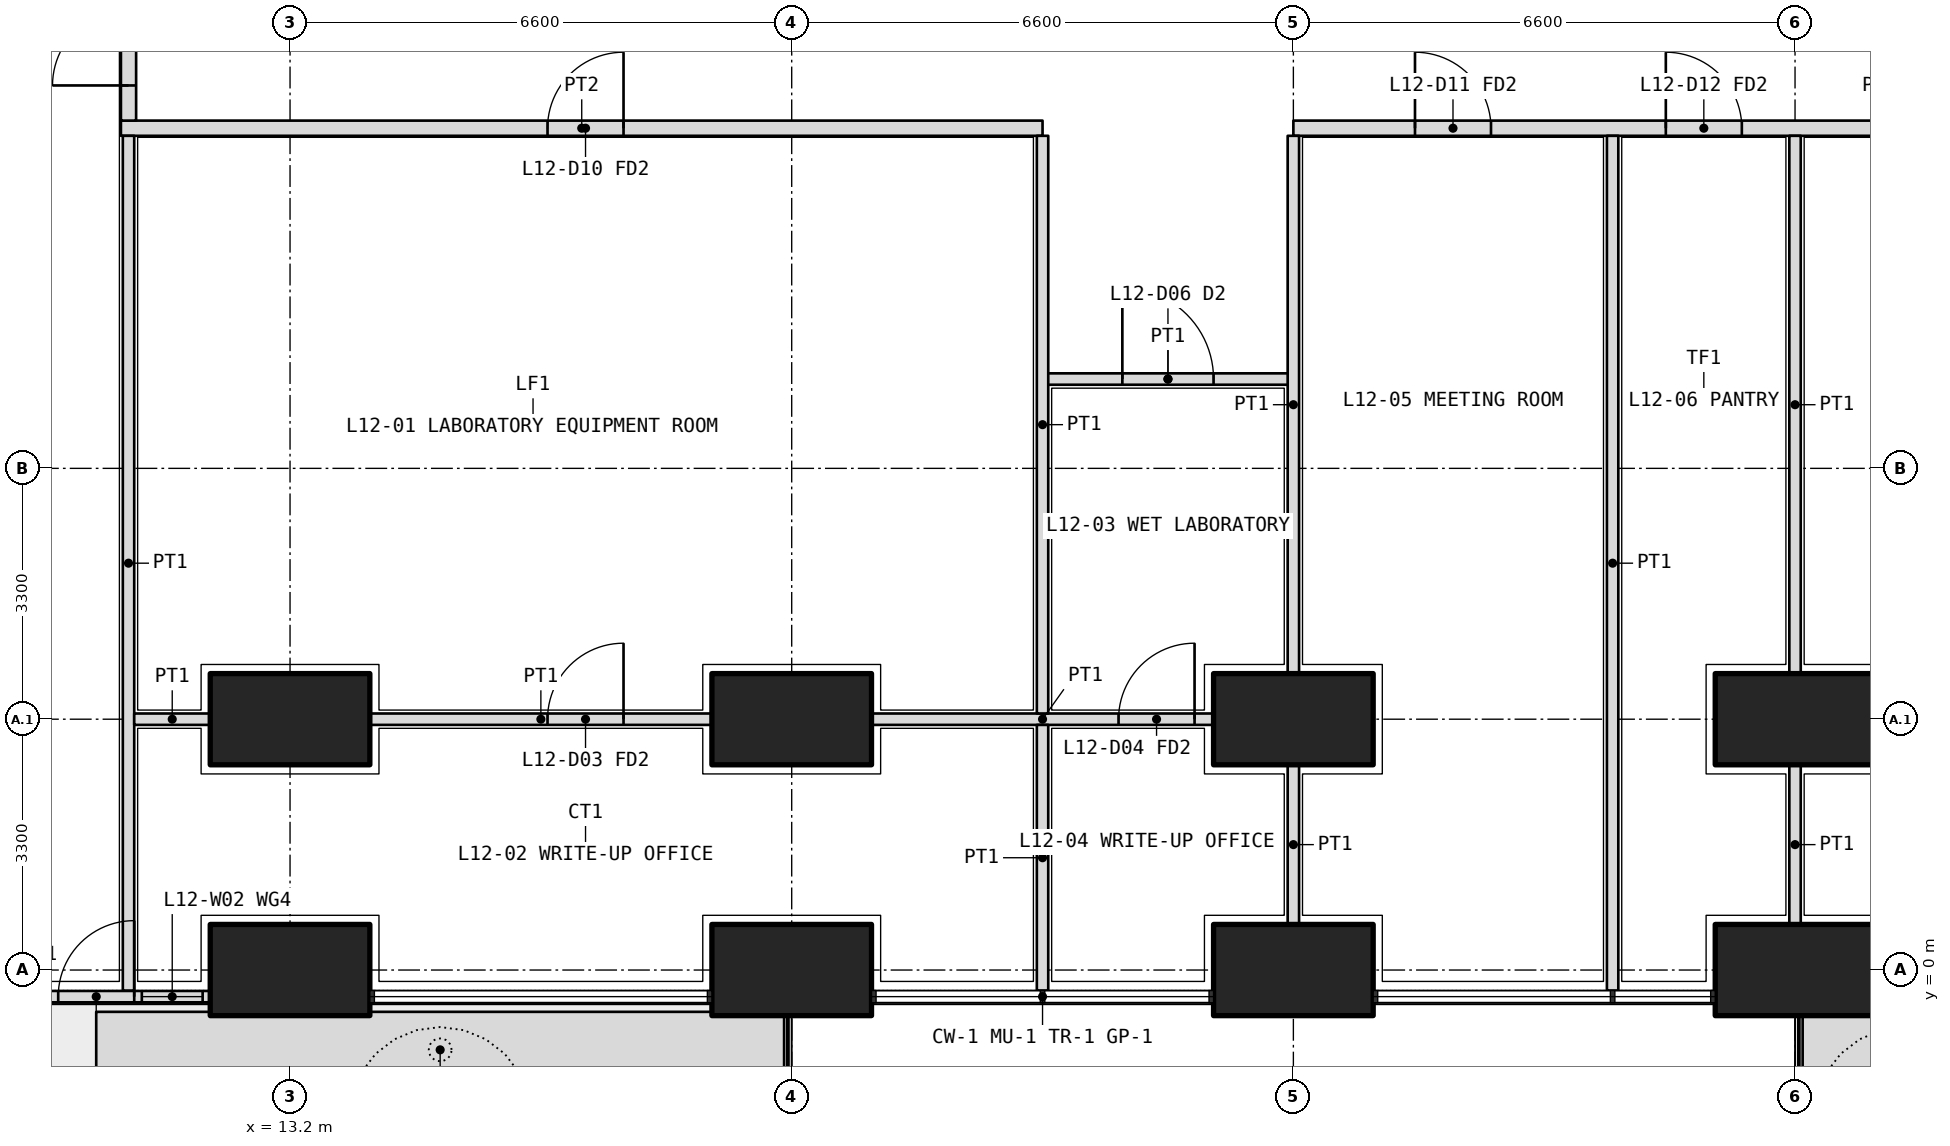
"""IFC4 building model, lengths in metres.
Left out: names, types, materials, properties, quantities, classifications, styles, units other than length and angle.
Written with IfcOpenShell. Run it as: python <this file> out.ifc"""

import sys

from ifc_helpers import new_model, si_unit, direction, frame, frame_2d, origin, origin_2d, place, context, subcontext, project, spatial, polyline, rectangle, outline, extrude, element, fill, save


model = new_model("IFC4")
c1 = context("Model", 3, precision=1e-05, world=origin(), true_north=direction((0.0, 1.0)))
c2 = subcontext(c1, "Body", "Model", "MODEL_VIEW")
j1 = project(units=[si_unit("LENGTHUNIT", "METRE"), si_unit("PLANEANGLEUNIT", "RADIAN")], contexts=[c1])
p1 = place(None, origin())
s1 = spatial("IfcSite", under=j1, at=p1, CompositionType="ELEMENT")
p2 = place(p1, origin())
s2 = spatial("IfcBuilding", under=s1, at=p2, CompositionType="ELEMENT")
p3 = place(p2, frame((0.0, 0.0, 54.9)))
s3 = spatial("IfcBuildingStorey", under=s2, at=p3, CompositionType="ELEMENT", Elevation=54.9)
for number, where, z_axis, x_axis in (
    (1, (13.2, 0.0, 0.0), (0.0, 0.0, 1.0), (1.0, 0.0, 0.0)),
    (2, (19.8, 0.0, 0.0), (0.0, 0.0, 1.0), (1.0, 0.0, 0.0)),
    (3, (26.4, 0.0, 0.0), (0.0, 0.0, 1.0), (1.0, 0.0, 0.0)),
    (4, (33.0, 0.0, 0.0), (0.0, 0.0, 1.0), (1.0, 0.0, 0.0)),
    (5, (13.2, 3.3, 0.0), (0.0, 0.0, 1.0), (1.0, 0.0, 0.0)),
    (6, (19.8, 3.3, 0.0), (0.0, 0.0, 1.0), (1.0, 0.0, 0.0)),
    (7, (26.4, 3.3, 0.0), (0.0, 0.0, 1.0), (1.0, 0.0, 0.0)),
    (8, (33.0, 3.3, 0.0), (0.0, 0.0, 1.0), (1.0, 0.0, 0.0)),
):
    element("IfcColumn", number, at=place(p3, frame(where, z_axis=z_axis, x_axis=x_axis)), inside=s3, PredefinedType="COLUMN", context=c2, shape_type="SweptSolid", body=[
        extrude(rectangle(XDim=2.1, YDim=1.2, at=origin_2d()), origin(), (0.0, 0.0, 1.0), 4.2),
    ])
p4 = place(p3, origin())
e9 = element("IfcWall", 9, at=p4, inside=s3, PredefinedType="USERDEFINED", context=c2, shape_type="SweptSolid", body=[
    extrude(outline(polyline([(10.65, -1.55), (19.7, -1.55), (19.7, -0.55), (10.65, -0.55), (10.65, -1.55)]), holes=[polyline([(10.8, -1.4), (19.55, -1.4), (19.55, -0.7), (10.8, -0.7), (10.8, -1.4)])]), origin(), (0.0, 0.0, 1.0), 1.05),
])
p5 = place(p3, origin())
e10 = element("IfcWall", 10, at=p5, inside=s3, PredefinedType="USERDEFINED", context=c2, shape_type="SweptSolid", body=[
    extrude(outline(polyline([(33.1, -1.55), (35.55, -1.55), (35.55, -0.55), (33.1, -0.55), (33.1, -1.55)]), holes=[polyline([(33.25, -1.4), (35.4, -1.4), (35.4, -0.7), (33.25, -0.7), (33.25, -1.4)])]), origin(), (0.0, 0.0, 1.0), 1.05),
])
p6 = place(p3, frame((7.65, -0.35, 0.0), z_axis=(0.0, 0.0, 1.0), x_axis=(1.0, 0.0, 0.0)))
e11 = element("IfcWall", 11, at=p6, inside=s3, PredefinedType="SOLIDWALL", context=c2, shape_type="SweptSolid", body=[
    extrude(rectangle(XDim=4.5, YDim=0.15, at=frame_2d((2.25, 0.0))), origin(), (0.0, 0.0, 1.0), 2.7),
])
p7 = place(p6, frame((2.5, 0.0, 0.0)))
e12 = element("IfcOpeningElement", 12, at=p7, cuts=e11, PredefinedType="OPENING", context=c2, shape_type="SweptSolid", body=[
    extrude(rectangle(XDim=1.0, YDim=2.4, at=frame_2d((0.5, 1.2))), frame((0.0, 0.085, 0.0), z_axis=(0.0, -1.0, 0.0), x_axis=(1.0, 0.0, 0.0)), (0.0, 0.0, 1.0), 0.17),
])
p8 = place(p6, frame((0.1, 0.0, 0.1)))
e13 = element("IfcOpeningElement", 13, at=p8, cuts=e11, PredefinedType="OPENING", context=c2, shape_type="SweptSolid", body=[
    extrude(rectangle(XDim=1.9, YDim=2.3, at=frame_2d((0.95, 1.15))), frame((0.0, 0.085, 0.0), z_axis=(0.0, -1.0, 0.0), x_axis=(1.0, 0.0, 0.0)), (0.0, 0.0, 1.0), 0.17),
])
p9 = place(p6, frame((3.6, 0.0, 0.1)))
e14 = element("IfcOpeningElement", 14, at=p9, cuts=e11, PredefinedType="OPENING", context=c2, shape_type="SweptSolid", body=[
    extrude(rectangle(XDim=0.8, YDim=2.3, at=frame_2d((0.4, 1.15))), frame((0.0, 0.085, 0.0), z_axis=(0.0, -1.0, 0.0), x_axis=(1.0, 0.0, 0.0)), (0.0, 0.0, 1.0), 0.17),
])
p10 = place(p3, frame((10.975, 11.075, 0.0), z_axis=(0.0, 0.0, 1.0), x_axis=(1.0, 0.0, 0.0)))
e15 = element("IfcWall", 15, at=p10, inside=s3, PredefinedType="PARTITIONING", context=c2, shape_type="SweptSolid", body=[
    extrude(rectangle(XDim=12.125, YDim=0.2, at=frame_2d((6.062, 0.0))), origin(), (0.0, 0.0, 1.0), 2.85),
])
p11 = place(p10, frame((5.613, 0.0, 0.0)))
e16 = element("IfcOpeningElement", 16, at=p11, cuts=e15, PredefinedType="OPENING", context=c2, shape_type="SweptSolid", body=[
    extrude(rectangle(XDim=1.0, YDim=2.1, at=frame_2d((0.5, 1.05))), frame((0.0, 0.11, 0.0), z_axis=(0.0, -1.0, 0.0), x_axis=(1.0, 0.0, 0.0)), (0.0, 0.0, 1.0), 0.22),
])
p12 = place(p3, frame((26.4, 11.075, 0.0), z_axis=(0.0, 0.0, 1.0), x_axis=(1.0, 0.0, 0.0)))
e17 = element("IfcWall", 17, at=p12, inside=s3, PredefinedType="PARTITIONING", context=c2, shape_type="SweptSolid", body=[
    extrude(rectangle(XDim=15.425, YDim=0.2, at=frame_2d((7.712, 0.0))), origin(), (0.0, 0.0, 1.0), 2.85),
])
p13 = place(p12, frame((1.6, 0.0, 0.0)))
e18 = element("IfcOpeningElement", 18, at=p13, cuts=e17, PredefinedType="OPENING", context=c2, shape_type="SweptSolid", body=[
    extrude(rectangle(XDim=1.0, YDim=2.1, at=frame_2d((0.5, 1.05))), frame((0.0, 0.11, 0.0), z_axis=(0.0, -1.0, 0.0), x_axis=(1.0, 0.0, 0.0)), (0.0, 0.0, 1.0), 0.22),
])
p14 = place(p12, frame((4.9, 0.0, 0.0)))
e19 = element("IfcOpeningElement", 19, at=p14, cuts=e17, PredefinedType="OPENING", context=c2, shape_type="SweptSolid", body=[
    extrude(rectangle(XDim=1.0, YDim=2.1, at=frame_2d((0.5, 1.05))), frame((0.0, 0.11, 0.0), z_axis=(0.0, -1.0, 0.0), x_axis=(1.0, 0.0, 0.0)), (0.0, 0.0, 1.0), 0.22),
])
p15 = place(p12, frame((10.363, 0.0, 0.0)))
e20 = element("IfcOpeningElement", 20, at=p15, cuts=e17, PredefinedType="OPENING", context=c2, shape_type="SweptSolid", body=[
    extrude(rectangle(XDim=1.2, YDim=2.1, at=frame_2d((0.6, 1.05))), frame((0.0, 0.11, 0.0), z_axis=(0.0, -1.0, 0.0), x_axis=(1.0, 0.0, 0.0)), (0.0, 0.0, 1.0), 0.22),
])
p16 = place(p3, frame((11.075, 11.175, 0.0), z_axis=(0.0, 0.0, 1.0), x_axis=(0.0, 1.0, 0.0)))
e21 = element("IfcWall", 21, at=p16, inside=s3, PredefinedType="PARTITIONING", context=c2, shape_type="SweptSolid", body=[
    extrude(rectangle(XDim=23.85, YDim=0.2, at=frame_2d((11.925, 0.0))), origin(), (0.0, 0.0, 1.0), 2.85),
])
p17 = place(p16, frame((0.462, 0.0, 0.0)))
e22 = element("IfcOpeningElement", 22, at=p17, cuts=e21, PredefinedType="OPENING", context=c2, shape_type="SweptSolid", body=[
    extrude(rectangle(XDim=1.0, YDim=2.1, at=frame_2d((0.5, 1.05))), frame((0.0, 0.11, 0.0), z_axis=(0.0, -1.0, 0.0), x_axis=(1.0, 0.0, 0.0)), (0.0, 0.0, 1.0), 0.22),
])
p18 = place(p16, frame((2.575, 0.0, 0.0)))
e23 = element("IfcOpeningElement", 23, at=p18, cuts=e21, PredefinedType="OPENING", context=c2, shape_type="SweptSolid", body=[
    extrude(rectangle(XDim=1.0, YDim=2.1, at=frame_2d((0.5, 1.05))), frame((0.0, 0.11, 0.0), z_axis=(0.0, -1.0, 0.0), x_axis=(1.0, 0.0, 0.0)), (0.0, 0.0, 1.0), 0.22),
])
p19 = place(p16, frame((5.625, 0.0, 0.0)))
e24 = element("IfcOpeningElement", 24, at=p19, cuts=e21, PredefinedType="OPENING", context=c2, shape_type="SweptSolid", body=[
    extrude(rectangle(XDim=0.9, YDim=2.1, at=frame_2d((0.45, 1.05))), frame((0.0, 0.11, 0.0), z_axis=(0.0, -1.0, 0.0), x_axis=(1.0, 0.0, 0.0)), (0.0, 0.0, 1.0), 0.22),
])
p20 = place(p16, frame((9.425, 0.0, 0.0)))
e25 = element("IfcOpeningElement", 25, at=p20, cuts=e21, PredefinedType="OPENING", context=c2, shape_type="SweptSolid", body=[
    extrude(rectangle(XDim=0.9, YDim=2.1, at=frame_2d((0.45, 1.05))), frame((0.0, 0.11, 0.0), z_axis=(0.0, -1.0, 0.0), x_axis=(1.0, 0.0, 0.0)), (0.0, 0.0, 1.0), 0.22),
])
p21 = place(p16, frame((12.975, 0.0, 0.0)))
e26 = element("IfcOpeningElement", 26, at=p21, cuts=e21, PredefinedType="OPENING", context=c2, shape_type="SweptSolid", body=[
    extrude(rectangle(XDim=1.0, YDim=2.1, at=frame_2d((0.5, 1.05))), frame((0.0, 0.11, 0.0), z_axis=(0.0, -1.0, 0.0), x_axis=(1.0, 0.0, 0.0)), (0.0, 0.0, 1.0), 0.22),
])
p22 = place(p16, frame((18.025, 0.0, 0.0)))
e27 = element("IfcOpeningElement", 27, at=p22, cuts=e21, PredefinedType="OPENING", context=c2, shape_type="SweptSolid", body=[
    extrude(rectangle(XDim=1.0, YDim=2.1, at=frame_2d((0.5, 1.05))), frame((0.0, 0.11, 0.0), z_axis=(0.0, -1.0, 0.0), x_axis=(1.0, 0.0, 0.0)), (0.0, 0.0, 1.0), 0.22),
])
p23 = place(p16, frame((22.387, 0.0, 0.0)))
e28 = element("IfcOpeningElement", 28, at=p23, cuts=e21, PredefinedType="OPENING", context=c2, shape_type="SweptSolid", body=[
    extrude(rectangle(XDim=1.0, YDim=2.1, at=frame_2d((0.5, 1.05))), frame((0.0, 0.11, 0.0), z_axis=(0.0, -1.0, 0.0), x_axis=(1.0, 0.0, 0.0)), (0.0, 0.0, 1.0), 0.22),
])
p24 = place(p3, frame((11.075, -0.27, 0.0), z_axis=(0.0, 0.0, 1.0), x_axis=(0.0, 1.0, 0.0)))
e29 = element("IfcWall", 29, at=p24, inside=s3, PredefinedType="PARTITIONING", context=c2, shape_type="SweptSolid", body=[
    extrude(rectangle(XDim=11.245, YDim=0.15, at=frame_2d((5.623, 0.0))), origin(), (0.0, 0.0, 1.0), 2.7),
])
p25 = place(p3, frame((11.15, 3.3, 0.0), z_axis=(0.0, 0.0, 1.0), x_axis=(1.0, 0.0, 0.0)))
e30 = element("IfcWall", 30, at=p25, inside=s3, PredefinedType="PARTITIONING", context=c2, shape_type="SweptSolid", body=[
    extrude(rectangle(XDim=1.0, YDim=0.15, at=frame_2d((0.5, 0.0))), origin(), (0.0, 0.0, 1.0), 3.9),
])
p26 = place(p3, frame((14.25, 3.3, 0.0), z_axis=(0.0, 0.0, 1.0), x_axis=(1.0, 0.0, 0.0)))
e31 = element("IfcWall", 31, at=p26, inside=s3, PredefinedType="PARTITIONING", context=c2, shape_type="SweptSolid", body=[
    extrude(rectangle(XDim=4.5, YDim=0.15, at=frame_2d((2.25, 0.0))), origin(), (0.0, 0.0, 1.0), 3.9),
])
p27 = place(p26, frame((2.337, 0.0, 0.0)))
e32 = element("IfcOpeningElement", 32, at=p27, cuts=e31, PredefinedType="OPENING", context=c2, shape_type="SweptSolid", body=[
    extrude(rectangle(XDim=1.0, YDim=2.1, at=frame_2d((0.5, 1.05))), frame((0.0, 0.085, 0.0), z_axis=(0.0, -1.0, 0.0), x_axis=(1.0, 0.0, 0.0)), (0.0, 0.0, 1.0), 0.17),
])
p28 = place(p3, frame((20.85, 3.3, 0.0), z_axis=(0.0, 0.0, 1.0), x_axis=(1.0, 0.0, 0.0)))
e33 = element("IfcWall", 33, at=p28, inside=s3, PredefinedType="PARTITIONING", context=c2, shape_type="SweptSolid", body=[
    extrude(rectangle(XDim=4.5, YDim=0.15, at=frame_2d((2.25, 0.0))), origin(), (0.0, 0.0, 1.0), 3.9),
])
p29 = place(p28, frame((3.25, 0.0, 0.0)))
e34 = element("IfcOpeningElement", 34, at=p29, cuts=e33, PredefinedType="OPENING", context=c2, shape_type="SweptSolid", body=[
    extrude(rectangle(XDim=1.0, YDim=2.1, at=frame_2d((0.5, 1.05))), frame((0.0, 0.085, 0.0), z_axis=(0.0, -1.0, 0.0), x_axis=(1.0, 0.0, 0.0)), (0.0, 0.0, 1.0), 0.17),
])
p30 = place(p3, frame((23.1, 7.775, 0.0), z_axis=(0.0, 0.0, 1.0), x_axis=(1.0, 0.0, 0.0)))
e35 = element("IfcWall", 35, at=p30, inside=s3, PredefinedType="PARTITIONING", context=c2, shape_type="SweptSolid", body=[
    extrude(rectangle(XDim=3.3, YDim=0.15, at=frame_2d((1.65, 0.0))), origin(), (0.0, 0.0, 1.0), 2.85),
])
p31 = place(p30, frame((1.05, 0.0, 0.0)))
e36 = element("IfcOpeningElement", 36, at=p31, cuts=e35, PredefinedType="OPENING", context=c2, shape_type="SweptSolid", body=[
    extrude(rectangle(XDim=1.2, YDim=2.1, at=frame_2d((0.6, 1.05))), frame((0.0, 0.085, 0.0), z_axis=(0.0, -1.0, 0.0), x_axis=(1.0, 0.0, 0.0)), (0.0, 0.0, 1.0), 0.17),
])
p32 = place(p3, frame((30.6, -0.27, 0.0), z_axis=(0.0, 0.0, 1.0), x_axis=(0.0, 1.0, 0.0)))
e37 = element("IfcWall", 37, at=p32, inside=s3, PredefinedType="PARTITIONING", context=c2, shape_type="SweptSolid", body=[
    extrude(rectangle(XDim=11.245, YDim=0.15, at=frame_2d((5.623, 0.0))), origin(), (0.0, 0.0, 1.0), 2.7),
])
p33 = place(p3, frame((33.0, 0.6, 0.0), z_axis=(0.0, 0.0, 1.0), x_axis=(0.0, 1.0, 0.0)))
e38 = element("IfcWall", 38, at=p33, inside=s3, PredefinedType="PARTITIONING", context=c2, shape_type="SweptSolid", body=[
    extrude(rectangle(XDim=2.1, YDim=0.15, at=frame_2d((1.05, 0.0))), origin(), (0.0, 0.0, 1.0), 2.85),
])
p34 = place(p3, frame((33.0, 3.9, 0.0), z_axis=(0.0, 0.0, 1.0), x_axis=(0.0, 1.0, 0.0)))
e39 = element("IfcWall", 39, at=p34, inside=s3, PredefinedType="PARTITIONING", context=c2, shape_type="SweptSolid", body=[
    extrude(rectangle(XDim=7.075, YDim=0.15, at=frame_2d((3.538, 0.0))), origin(), (0.0, 0.0, 1.0), 2.85),
])
p35 = place(p3, frame((23.1, -0.27, 0.0), z_axis=(0.0, 0.0, 1.0), x_axis=(0.0, 1.0, 0.0)))
e40 = element("IfcWall", 40, at=p35, inside=s3, PredefinedType="PARTITIONING", context=c2, shape_type="SweptSolid", body=[
    extrude(rectangle(XDim=3.495, YDim=0.15, at=frame_2d((1.748, 0.0))), origin(), (0.0, 0.0, 1.0), 2.7),
])
p36 = place(p3, frame((23.1, 3.375, 0.0), z_axis=(0.0, 0.0, 1.0), x_axis=(0.0, 1.0, 0.0)))
e41 = element("IfcWall", 41, at=p36, inside=s3, PredefinedType="PARTITIONING", context=c2, shape_type="SweptSolid", body=[
    extrude(rectangle(XDim=7.6, YDim=0.15, at=frame_2d((3.8, 0.0))), origin(), (0.0, 0.0, 1.0), 3.9),
])
p37 = place(p3, frame((26.4, 0.6, 0.0), z_axis=(0.0, 0.0, 1.0), x_axis=(0.0, 1.0, 0.0)))
e42 = element("IfcWall", 42, at=p37, inside=s3, PredefinedType="PARTITIONING", context=c2, shape_type="SweptSolid", body=[
    extrude(rectangle(XDim=2.1, YDim=0.15, at=frame_2d((1.05, 0.0))), origin(), (0.0, 0.0, 1.0), 2.85),
])
p38 = place(p3, frame((26.4, 3.9, 0.0), z_axis=(0.0, 0.0, 1.0), x_axis=(0.0, 1.0, 0.0)))
e43 = element("IfcWall", 43, at=p38, inside=s3, PredefinedType="PARTITIONING", context=c2, shape_type="SweptSolid", body=[
    extrude(rectangle(XDim=7.075, YDim=0.15, at=frame_2d((3.538, 0.0))), origin(), (0.0, 0.0, 1.0), 2.85),
])
p39 = place(p7, origin())
e44 = element("IfcDoor", 44, at=p39, inside=s3, OperationType="SINGLE_SWING_RIGHT", PredefinedType="DOOR", context=c2, shape_type="SweptSolid", body=[
    extrude(rectangle(XDim=1.0, YDim=2.4, at=frame_2d((0.5, 1.2))), frame((0.0, 0.025, 0.0), z_axis=(0.0, -1.0, 0.0), x_axis=(1.0, 0.0, 0.0)), (0.0, 0.0, 1.0), 0.05),
])
fill(e12, e44)
p40 = place(p9, origin())
e45 = element("IfcWindow", 45, at=p40, inside=s3, PartitioningType="SINGLE_PANEL", PredefinedType="WINDOW", context=c2, shape_type="SweptSolid", body=[
    extrude(rectangle(XDim=0.8, YDim=2.3, at=frame_2d((0.4, 1.15))), frame((0.0, 0.03, 0.0), z_axis=(0.0, -1.0, 0.0), x_axis=(1.0, 0.0, 0.0)), (0.0, 0.0, 1.0), 0.06),
])
fill(e14, e45)
p41 = place(p11, origin())
e46 = element("IfcDoor", 46, at=p41, inside=s3, OperationType="SINGLE_SWING_RIGHT", PredefinedType="DOOR", context=c2, shape_type="SweptSolid", body=[
    extrude(rectangle(XDim=1.0, YDim=2.1, at=frame_2d((0.5, 1.05))), frame((0.0, 0.025, 0.0), z_axis=(0.0, -1.0, 0.0), x_axis=(1.0, 0.0, 0.0)), (0.0, 0.0, 1.0), 0.05),
])
fill(e16, e46)
p42 = place(p27, origin())
e47 = element("IfcDoor", 47, at=p42, inside=s3, OperationType="SINGLE_SWING_RIGHT", PredefinedType="DOOR", context=c2, shape_type="SweptSolid", body=[
    extrude(rectangle(XDim=1.0, YDim=2.1, at=frame_2d((0.5, 1.05))), frame((0.0, 0.025, 0.0), z_axis=(0.0, -1.0, 0.0), x_axis=(1.0, 0.0, 0.0)), (0.0, 0.0, 1.0), 0.05),
])
fill(e32, e47)
p43 = place(p31, origin())
e48 = element("IfcDoor", 48, at=p43, inside=s3, OperationType="DOUBLE_DOOR_SINGLE_SWING", PredefinedType="DOOR", context=c2, shape_type="SweptSolid", body=[
    extrude(rectangle(XDim=1.2, YDim=2.1, at=frame_2d((0.6, 1.05))), frame((0.0, 0.025, 0.0), z_axis=(0.0, -1.0, 0.0), x_axis=(1.0, 0.0, 0.0)), (0.0, 0.0, 1.0), 0.05),
])
fill(e36, e48)
p44 = place(p29, origin())
e49 = element("IfcDoor", 49, at=p44, inside=s3, OperationType="SINGLE_SWING_RIGHT", PredefinedType="DOOR", context=c2, shape_type="SweptSolid", body=[
    extrude(rectangle(XDim=1.0, YDim=2.1, at=frame_2d((0.5, 1.05))), frame((0.0, 0.025, 0.0), z_axis=(0.0, -1.0, 0.0), x_axis=(1.0, 0.0, 0.0)), (0.0, 0.0, 1.0), 0.05),
])
fill(e34, e49)
p45 = place(p13, origin())
e50 = element("IfcDoor", 50, at=p45, inside=s3, OperationType="SINGLE_SWING_LEFT", PredefinedType="DOOR", context=c2, shape_type="SweptSolid", body=[
    extrude(rectangle(XDim=1.0, YDim=2.1, at=frame_2d((0.5, 1.05))), frame((0.0, 0.025, 0.0), z_axis=(0.0, -1.0, 0.0), x_axis=(1.0, 0.0, 0.0)), (0.0, 0.0, 1.0), 0.05),
])
fill(e18, e50)
p46 = place(p14, origin())
e51 = element("IfcDoor", 51, at=p46, inside=s3, OperationType="SINGLE_SWING_LEFT", PredefinedType="DOOR", context=c2, shape_type="SweptSolid", body=[
    extrude(rectangle(XDim=1.0, YDim=2.1, at=frame_2d((0.5, 1.05))), frame((0.0, 0.025, 0.0), z_axis=(0.0, -1.0, 0.0), x_axis=(1.0, 0.0, 0.0)), (0.0, 0.0, 1.0), 0.05),
])
fill(e19, e51)
p47 = place(p17, origin())
e52 = element("IfcDoor", 52, at=p47, inside=s3, OperationType="SINGLE_SWING_LEFT", PredefinedType="DOOR", context=c2, shape_type="SweptSolid", body=[
    extrude(rectangle(XDim=1.0, YDim=2.1, at=frame_2d((0.5, 1.05))), frame((0.0, 0.025, 0.0), z_axis=(0.0, -1.0, 0.0), x_axis=(1.0, 0.0, 0.0)), (0.0, 0.0, 1.0), 0.05),
])
fill(e22, e52)
save(model, sys.argv[1])
